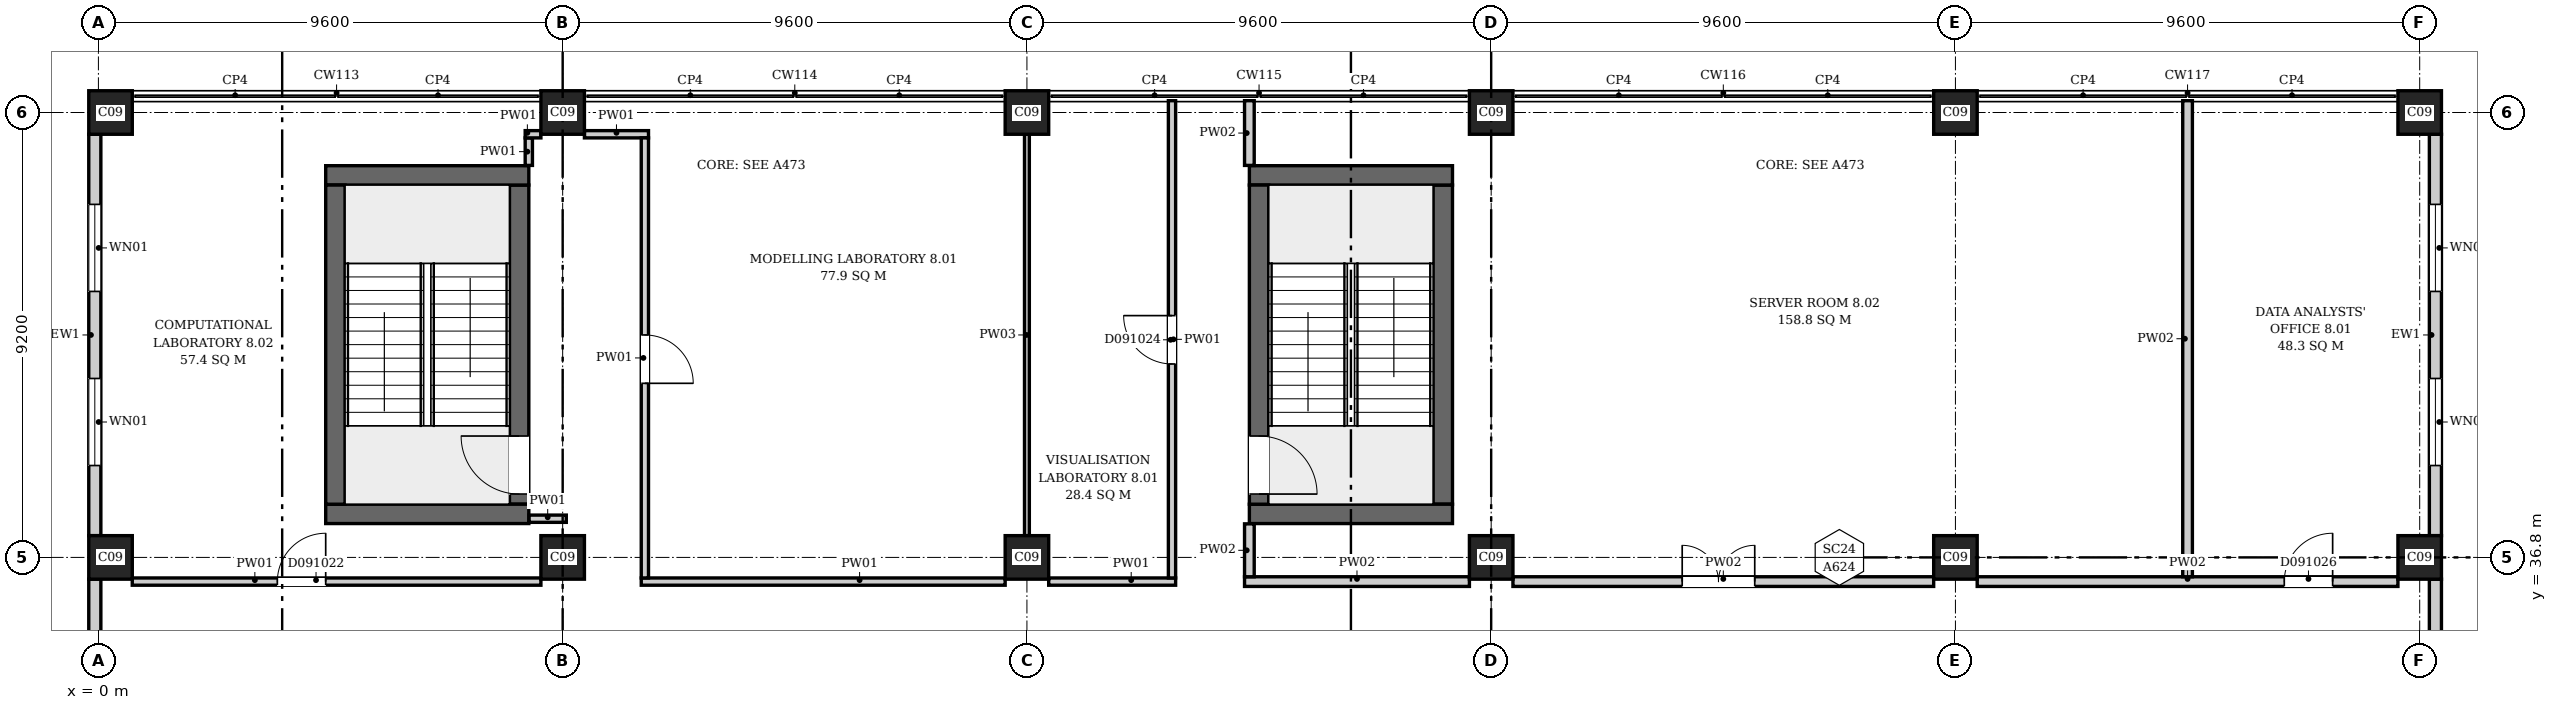
"""IFC4 building model, lengths in metres.
Left out: names, types, materials, properties, quantities, classifications, styles, units other than length and angle.
Written with IfcOpenShell. Run it as: python <this file> out.ifc"""

import sys

from ifc_helpers import new_model, si_unit, direction, frame, frame_2d, origin, origin_2d, place, context, subcontext, project, spatial, rectangle, extrude, element, fill, save


model = new_model("IFC4")
c1 = context("Model", 3, precision=1e-05, world=origin(), true_north=direction((0.0, 1.0)))
c2 = subcontext(c1, "Body", "Model", "MODEL_VIEW")
j1 = project(units=[si_unit("LENGTHUNIT", "METRE"), si_unit("PLANEANGLEUNIT", "RADIAN")], contexts=[c1])
p1 = place(None, origin())
s1 = spatial("IfcSite", under=j1, at=p1, CompositionType="ELEMENT")
p2 = place(p1, origin())
s2 = spatial("IfcBuilding", under=s1, at=p2, CompositionType="ELEMENT")
p3 = place(p2, frame((0.0, 0.0, 44.5)))
s3 = spatial("IfcBuildingStorey", under=s2, at=p3, CompositionType="ELEMENT", Elevation=44.5)
for number, where, z_axis, x_axis in (
    (1, (4.7, 37.7, 0.0), (0.0, 0.0, 1.0), (1.0, 0.0, 0.0)),
    (2, (4.7, 44.7, 0.0), (0.0, 0.0, 1.0), (1.0, 0.0, 0.0)),
):
    element("IfcWall", number, at=place(p3, frame(where, z_axis=z_axis, x_axis=x_axis)), inside=s3, PredefinedType="SHEAR", context=c2, shape_type="SweptSolid", body=[
        extrude(rectangle(XDim=4.2, YDim=0.4, at=frame_2d((2.1, 0.0))), origin(), (0.0, 0.0, 1.0), 4.2),
    ])
p4 = place(p3, frame((4.9, 37.9, 0.0), z_axis=(0.0, 0.0, 1.0), x_axis=(0.0, 1.0, 0.0)))
e3 = element("IfcWall", 3, at=p4, inside=s3, PredefinedType="SHEAR", context=c2, shape_type="SweptSolid", body=[
    extrude(rectangle(XDim=6.6, YDim=0.4, at=frame_2d((3.3, 0.0))), origin(), (0.0, 0.0, 1.0), 4.2),
])
p5 = place(p3, frame((8.7, 37.9, 0.0), z_axis=(0.0, 0.0, 1.0), x_axis=(0.0, 1.0, 0.0)))
e4 = element("IfcWall", 4, at=p5, inside=s3, PredefinedType="SHEAR", context=c2, shape_type="SweptSolid", body=[
    extrude(rectangle(XDim=6.6, YDim=0.4, at=frame_2d((3.3, 0.0))), origin(), (0.0, 0.0, 1.0), 4.2),
])
p6 = place(p5, frame((0.21, 0.0, 0.0)))
e5 = element("IfcOpeningElement", 5, at=p6, cuts=e4, PredefinedType="OPENING", context=c2, shape_type="SweptSolid", body=[
    extrude(rectangle(XDim=1.2, YDim=2.1, at=frame_2d((0.6, 1.05))), frame((0.0, 0.21, 0.0), z_axis=(0.0, -1.0, 0.0), x_axis=(1.0, 0.0, 0.0)), (0.0, 0.0, 1.0), 0.42),
])
for number, where, z_axis, x_axis in (
    (6, (23.8, 37.7, 0.0), (0.0, 0.0, 1.0), (1.0, 0.0, 0.0)),
    (7, (23.8, 44.7, 0.0), (0.0, 0.0, 1.0), (1.0, 0.0, 0.0)),
):
    element("IfcWall", number, at=place(p3, frame(where, z_axis=z_axis, x_axis=x_axis)), inside=s3, PredefinedType="SHEAR", context=c2, shape_type="SweptSolid", body=[
        extrude(rectangle(XDim=4.2, YDim=0.4, at=frame_2d((2.1, 0.0))), origin(), (0.0, 0.0, 1.0), 4.2),
    ])
p7 = place(p3, frame((24.0, 37.9, 0.0), z_axis=(0.0, 0.0, 1.0), x_axis=(0.0, 1.0, 0.0)))
e8 = element("IfcWall", 8, at=p7, inside=s3, PredefinedType="SHEAR", context=c2, shape_type="SweptSolid", body=[
    extrude(rectangle(XDim=6.6, YDim=0.4, at=frame_2d((3.3, 0.0))), origin(), (0.0, 0.0, 1.0), 4.2),
])
p8 = place(p7, frame((0.21, 0.0, 0.0)))
e9 = element("IfcOpeningElement", 9, at=p8, cuts=e8, PredefinedType="OPENING", context=c2, shape_type="SweptSolid", body=[
    extrude(rectangle(XDim=1.2, YDim=2.1, at=frame_2d((0.6, 1.05))), frame((0.0, 0.21, 0.0), z_axis=(0.0, -1.0, 0.0), x_axis=(1.0, 0.0, 0.0)), (0.0, 0.0, 1.0), 0.42),
])
p9 = place(p3, frame((27.8, 37.9, 0.0), z_axis=(0.0, 0.0, 1.0), x_axis=(0.0, 1.0, 0.0)))
e10 = element("IfcWall", 10, at=p9, inside=s3, PredefinedType="SHEAR", context=c2, shape_type="SweptSolid", body=[
    extrude(rectangle(XDim=6.6, YDim=0.4, at=frame_2d((3.3, 0.0))), origin(), (0.0, 0.0, 1.0), 4.2),
])
for number, where, z_axis, x_axis in (
    (11, (0.25, 36.8, 0.0), (0.0, 0.0, 1.0), (1.0, 0.0, 0.0)),
    (12, (9.6, 36.8, 0.0), (0.0, 0.0, 1.0), (1.0, 0.0, 0.0)),
    (13, (19.2, 36.8, 0.0), (0.0, 0.0, 1.0), (1.0, 0.0, 0.0)),
    (14, (28.8, 36.8, 0.0), (0.0, 0.0, 1.0), (1.0, 0.0, 0.0)),
    (15, (38.4, 36.8, 0.0), (0.0, 0.0, 1.0), (1.0, 0.0, 0.0)),
    (16, (48.0, 36.8, 0.0), (0.0, 0.0, 1.0), (1.0, 0.0, 0.0)),
    (17, (0.25, 46.0, 0.0), (0.0, 0.0, 1.0), (1.0, 0.0, 0.0)),
    (18, (9.6, 46.0, 0.0), (0.0, 0.0, 1.0), (1.0, 0.0, 0.0)),
    (19, (19.2, 46.0, 0.0), (0.0, 0.0, 1.0), (1.0, 0.0, 0.0)),
    (20, (28.8, 46.0, 0.0), (0.0, 0.0, 1.0), (1.0, 0.0, 0.0)),
    (21, (38.4, 46.0, 0.0), (0.0, 0.0, 1.0), (1.0, 0.0, 0.0)),
    (22, (48.0, 46.0, 0.0), (0.0, 0.0, 1.0), (1.0, 0.0, 0.0)),
):
    element("IfcColumn", number, at=place(p3, frame(where, z_axis=z_axis, x_axis=x_axis)), inside=s3, PredefinedType="COLUMN", context=c2, shape_type="SweptSolid", body=[
        extrude(rectangle(XDim=0.9, YDim=0.9, at=origin_2d()), origin(), (0.0, 0.0, 1.0), 4.2),
    ])
p10 = place(p3, frame((-0.074, 36.35, 0.0), z_axis=(0.0, 0.0, 1.0), x_axis=(0.0, -1.0, 0.0)))
e23 = element("IfcWall", 23, at=p10, inside=s3, PredefinedType="ELEMENTEDWALL", context=c2, shape_type="SweptSolid", body=[
    extrude(rectangle(XDim=8.3, YDim=0.25, at=frame_2d((4.15, 0.0))), origin(), (0.0, 0.0, 1.0), 3.9),
])
p11 = place(p10, frame((5.05, 0.0, 0.9)))
e24 = element("IfcOpeningElement", 24, at=p11, cuts=e23, PredefinedType="OPENING", context=c2, shape_type="SweptSolid", body=[
    extrude(rectangle(XDim=1.8, YDim=2.6, at=frame_2d((0.9, 1.3))), frame((0.0, 0.135, 0.0), z_axis=(0.0, -1.0, 0.0), x_axis=(1.0, 0.0, 0.0)), (0.0, 0.0, 1.0), 0.27),
])
p12 = place(p10, frame((1.7, 0.0, 0.9)))
e25 = element("IfcOpeningElement", 25, at=p12, cuts=e23, PredefinedType="OPENING", context=c2, shape_type="SweptSolid", body=[
    extrude(rectangle(XDim=1.8, YDim=2.6, at=frame_2d((0.9, 1.3))), frame((0.0, 0.135, 0.0), z_axis=(0.0, -1.0, 0.0), x_axis=(1.0, 0.0, 0.0)), (0.0, 0.0, 1.0), 0.27),
])
p13 = place(p3, frame((-0.074, 45.55, 0.0), z_axis=(0.0, 0.0, 1.0), x_axis=(0.0, -1.0, 0.0)))
e26 = element("IfcWall", 26, at=p13, inside=s3, PredefinedType="ELEMENTEDWALL", context=c2, shape_type="SweptSolid", body=[
    extrude(rectangle(XDim=8.3, YDim=0.25, at=frame_2d((4.15, 0.0))), origin(), (0.0, 0.0, 1.0), 3.9),
])
p14 = place(p13, frame((5.05, 0.0, 0.9)))
e27 = element("IfcOpeningElement", 27, at=p14, cuts=e26, PredefinedType="OPENING", context=c2, shape_type="SweptSolid", body=[
    extrude(rectangle(XDim=1.8, YDim=2.6, at=frame_2d((0.9, 1.3))), frame((0.0, 0.135, 0.0), z_axis=(0.0, -1.0, 0.0), x_axis=(1.0, 0.0, 0.0)), (0.0, 0.0, 1.0), 0.27),
])
p15 = place(p13, frame((1.45, 0.0, 0.9)))
e28 = element("IfcOpeningElement", 28, at=p15, cuts=e26, PredefinedType="OPENING", context=c2, shape_type="SweptSolid", body=[
    extrude(rectangle(XDim=1.8, YDim=2.6, at=frame_2d((0.9, 1.3))), frame((0.0, 0.135, 0.0), z_axis=(0.0, -1.0, 0.0), x_axis=(1.0, 0.0, 0.0)), (0.0, 0.0, 1.0), 0.27),
])
p16 = place(p3, frame((48.325, 28.05, 0.0), z_axis=(0.0, 0.0, 1.0), x_axis=(0.0, 1.0, 0.0)))
e29 = element("IfcWall", 29, at=p16, inside=s3, PredefinedType="ELEMENTEDWALL", context=c2, shape_type="SweptSolid", body=[
    extrude(rectangle(XDim=8.3, YDim=0.25, at=frame_2d((4.15, 0.0))), origin(), (0.0, 0.0, 1.0), 3.9),
])
p17 = place(p16, frame((1.45, 0.0, 0.9)))
e30 = element("IfcOpeningElement", 30, at=p17, cuts=e29, PredefinedType="OPENING", context=c2, shape_type="SweptSolid", body=[
    extrude(rectangle(XDim=1.8, YDim=2.6, at=frame_2d((0.9, 1.3))), frame((0.0, 0.135, 0.0), z_axis=(0.0, -1.0, 0.0), x_axis=(1.0, 0.0, 0.0)), (0.0, 0.0, 1.0), 0.27),
])
p18 = place(p16, frame((4.8, 0.0, 0.9)))
e31 = element("IfcOpeningElement", 31, at=p18, cuts=e29, PredefinedType="OPENING", context=c2, shape_type="SweptSolid", body=[
    extrude(rectangle(XDim=1.8, YDim=2.6, at=frame_2d((0.9, 1.3))), frame((0.0, 0.135, 0.0), z_axis=(0.0, -1.0, 0.0), x_axis=(1.0, 0.0, 0.0)), (0.0, 0.0, 1.0), 0.27),
])
p19 = place(p3, frame((48.325, 37.25, 0.0), z_axis=(0.0, 0.0, 1.0), x_axis=(0.0, 1.0, 0.0)))
e32 = element("IfcWall", 32, at=p19, inside=s3, PredefinedType="ELEMENTEDWALL", context=c2, shape_type="SweptSolid", body=[
    extrude(rectangle(XDim=8.3, YDim=0.25, at=frame_2d((4.15, 0.0))), origin(), (0.0, 0.0, 1.0), 3.9),
])
p20 = place(p19, frame((1.45, 0.0, 0.9)))
e33 = element("IfcOpeningElement", 33, at=p20, cuts=e32, PredefinedType="OPENING", context=c2, shape_type="SweptSolid", body=[
    extrude(rectangle(XDim=1.8, YDim=2.6, at=frame_2d((0.9, 1.3))), frame((0.0, 0.135, 0.0), z_axis=(0.0, -1.0, 0.0), x_axis=(1.0, 0.0, 0.0)), (0.0, 0.0, 1.0), 0.27),
])
p21 = place(p19, frame((5.05, 0.0, 0.9)))
e34 = element("IfcOpeningElement", 34, at=p21, cuts=e32, PredefinedType="OPENING", context=c2, shape_type="SweptSolid", body=[
    extrude(rectangle(XDim=1.8, YDim=2.6, at=frame_2d((0.9, 1.3))), frame((0.0, 0.135, 0.0), z_axis=(0.0, -1.0, 0.0), x_axis=(1.0, 0.0, 0.0)), (0.0, 0.0, 1.0), 0.27),
])
p22 = place(p3, frame((0.7, 36.3, 0.0), z_axis=(0.0, 0.0, 1.0), x_axis=(1.0, 0.0, 0.0)))
e35 = element("IfcWall", 35, at=p22, inside=s3, PredefinedType="PARTITIONING", context=c2, shape_type="SweptSolid", body=[
    extrude(rectangle(XDim=8.45, YDim=0.15, at=frame_2d((4.225, 0.0))), origin(), (0.0, 0.0, 1.0), 3.9),
])
p23 = place(p22, frame((3.0, 0.0, 0.0)))
e36 = element("IfcOpeningElement", 36, at=p23, cuts=e35, PredefinedType="OPENING", context=c2, shape_type="SweptSolid", body=[
    extrude(rectangle(XDim=1.0, YDim=2.1, at=frame_2d((0.5, 1.05))), frame((0.0, 0.085, 0.0), z_axis=(0.0, -1.0, 0.0), x_axis=(1.0, 0.0, 0.0)), (0.0, 0.0, 1.0), 0.17),
])
p24 = place(p3, frame((8.9, 44.906, 0.0), z_axis=(0.0, 0.0, 1.0), x_axis=(0.0, 1.0, 0.0)))
e37 = element("IfcWall", 37, at=p24, inside=s3, PredefinedType="PARTITIONING", context=c2, shape_type="SweptSolid", body=[
    extrude(rectangle(XDim=0.569, YDim=0.15, at=frame_2d((0.285, 0.0))), origin(), (0.0, 0.0, 1.0), 3.9),
])
p25 = place(p3, frame((8.825, 45.55, 0.0), z_axis=(0.0, 0.0, 1.0), x_axis=(1.0, 0.0, 0.0)))
e38 = element("IfcWall", 38, at=p25, inside=s3, PredefinedType="PARTITIONING", context=c2, shape_type="SweptSolid", body=[
    extrude(rectangle(XDim=0.325, YDim=0.15, at=frame_2d((0.163, 0.0))), origin(), (0.0, 0.0, 1.0), 3.9),
])
p26 = place(p3, frame((8.906, 37.6, 0.0), z_axis=(0.0, 0.0, 1.0), x_axis=(1.0, 0.0, 0.0)))
e39 = element("IfcWall", 39, at=p26, inside=s3, PredefinedType="PARTITIONING", context=c2, shape_type="SweptSolid", body=[
    extrude(rectangle(XDim=0.769, YDim=0.15, at=frame_2d((0.385, 0.0))), origin(), (0.0, 0.0, 1.0), 3.9),
])
p27 = place(p3, frame((10.05, 45.55, 0.0), z_axis=(0.0, 0.0, 1.0), x_axis=(1.0, 0.0, 0.0)))
e40 = element("IfcWall", 40, at=p27, inside=s3, PredefinedType="PARTITIONING", context=c2, shape_type="SweptSolid", body=[
    extrude(rectangle(XDim=1.325, YDim=0.15, at=frame_2d((0.663, 0.0))), origin(), (0.0, 0.0, 1.0), 3.9),
])
p28 = place(p3, frame((11.225, 36.3, 0.0), z_axis=(0.0, 0.0, 1.0), x_axis=(1.0, 0.0, 0.0)))
e41 = element("IfcWall", 41, at=p28, inside=s3, PredefinedType="PARTITIONING", context=c2, shape_type="SweptSolid", body=[
    extrude(rectangle(XDim=7.525, YDim=0.15, at=frame_2d((3.762, 0.0))), origin(), (0.0, 0.0, 1.0), 3.9),
])
p29 = place(p3, frame((11.3, 36.375, 0.0), z_axis=(0.0, 0.0, 1.0), x_axis=(0.0, 1.0, 0.0)))
e42 = element("IfcWall", 42, at=p29, inside=s3, PredefinedType="PARTITIONING", context=c2, shape_type="SweptSolid", body=[
    extrude(rectangle(XDim=9.1, YDim=0.15, at=frame_2d((4.55, 0.0))), origin(), (0.0, 0.0, 1.0), 3.9),
])
p30 = place(p29, frame((4.025, 0.0, 0.0)))
e43 = element("IfcOpeningElement", 43, at=p30, cuts=e42, PredefinedType="OPENING", context=c2, shape_type="SweptSolid", body=[
    extrude(rectangle(XDim=1.0, YDim=2.1, at=frame_2d((0.5, 1.05))), frame((0.0, 0.085, 0.0), z_axis=(0.0, -1.0, 0.0), x_axis=(1.0, 0.0, 0.0)), (0.0, 0.0, 1.0), 0.17),
])
p31 = place(p3, frame((19.2, 37.25, 0.0), z_axis=(0.0, 0.0, 1.0), x_axis=(0.0, 1.0, 0.0)))
e44 = element("IfcWall", 44, at=p31, inside=s3, PredefinedType="PARTITIONING", context=c2, shape_type="SweptSolid", body=[
    extrude(rectangle(XDim=8.3, YDim=0.1, at=frame_2d((4.15, 0.0))), origin(), (0.0, 0.0, 1.0), 3.9),
])
p32 = place(p3, frame((19.65, 36.3, 0.0), z_axis=(0.0, 0.0, 1.0), x_axis=(1.0, 0.0, 0.0)))
e45 = element("IfcWall", 45, at=p32, inside=s3, PredefinedType="PARTITIONING", context=c2, shape_type="SweptSolid", body=[
    extrude(rectangle(XDim=2.625, YDim=0.15, at=frame_2d((1.312, 0.0))), origin(), (0.0, 0.0, 1.0), 3.9),
])
p33 = place(p3, frame((22.2, 36.375, 0.0), z_axis=(0.0, 0.0, 1.0), x_axis=(0.0, 1.0, 0.0)))
e46 = element("IfcWall", 46, at=p33, inside=s3, PredefinedType="PARTITIONING", context=c2, shape_type="SweptSolid", body=[
    extrude(rectangle(XDim=9.869, YDim=0.15, at=frame_2d((4.935, 0.0))), origin(), (0.0, 0.0, 1.0), 3.9),
])
p34 = place(p33, frame((4.425, 0.0, 0.0)))
e47 = element("IfcOpeningElement", 47, at=p34, cuts=e46, PredefinedType="OPENING", context=c2, shape_type="SweptSolid", body=[
    extrude(rectangle(XDim=1.0, YDim=2.1, at=frame_2d((0.5, 1.05))), frame((0.0, 0.085, 0.0), z_axis=(0.0, -1.0, 0.0), x_axis=(1.0, 0.0, 0.0)), (0.0, 0.0, 1.0), 0.17),
])
p35 = place(p3, frame((23.7, 36.3, 0.0), z_axis=(0.0, 0.0, 1.0), x_axis=(1.0, 0.0, 0.0)))
e48 = element("IfcWall", 48, at=p35, inside=s3, PredefinedType="PARTITIONING", context=c2, shape_type="SweptSolid", body=[
    extrude(rectangle(XDim=4.65, YDim=0.2, at=frame_2d((2.325, 0.0))), origin(), (0.0, 0.0, 1.0), 3.9),
])
p36 = place(p3, frame((23.8, 36.4, 0.0), z_axis=(0.0, 0.0, 1.0), x_axis=(0.0, 1.0, 0.0)))
e49 = element("IfcWall", 49, at=p36, inside=s3, PredefinedType="PARTITIONING", context=c2, shape_type="SweptSolid", body=[
    extrude(rectangle(XDim=1.094, YDim=0.2, at=frame_2d((0.547, 0.0))), origin(), (0.0, 0.0, 1.0), 3.9),
])
p37 = place(p3, frame((23.8, 44.906, 0.0), z_axis=(0.0, 0.0, 1.0), x_axis=(0.0, 1.0, 0.0)))
e50 = element("IfcWall", 50, at=p37, inside=s3, PredefinedType="PARTITIONING", context=c2, shape_type="SweptSolid", body=[
    extrude(rectangle(XDim=1.338, YDim=0.2, at=frame_2d((0.669, 0.0))), origin(), (0.0, 0.0, 1.0), 3.9),
])
p38 = place(p3, frame((29.25, 36.3, 0.0), z_axis=(0.0, 0.0, 1.0), x_axis=(1.0, 0.0, 0.0)))
e51 = element("IfcWall", 51, at=p38, inside=s3, PredefinedType="PARTITIONING", context=c2, shape_type="SweptSolid", body=[
    extrude(rectangle(XDim=8.7, YDim=0.2, at=frame_2d((4.35, 0.0))), origin(), (0.0, 0.0, 1.0), 3.9),
])
p39 = place(p38, frame((3.5, 0.0, 0.0)))
e52 = element("IfcOpeningElement", 52, at=p39, cuts=e51, PredefinedType="OPENING", context=c2, shape_type="SweptSolid", body=[
    extrude(rectangle(XDim=1.5, YDim=2.1, at=frame_2d((0.75, 1.05))), frame((0.0, 0.11, 0.0), z_axis=(0.0, -1.0, 0.0), x_axis=(1.0, 0.0, 0.0)), (0.0, 0.0, 1.0), 0.22),
])
p40 = place(p3, frame((38.85, 36.3, 0.0), z_axis=(0.0, 0.0, 1.0), x_axis=(1.0, 0.0, 0.0)))
e53 = element("IfcWall", 53, at=p40, inside=s3, PredefinedType="PARTITIONING", context=c2, shape_type="SweptSolid", body=[
    extrude(rectangle(XDim=8.7, YDim=0.2, at=frame_2d((4.35, 0.0))), origin(), (0.0, 0.0, 1.0), 3.9),
])
p41 = place(p40, frame((6.35, 0.0, 0.0)))
e54 = element("IfcOpeningElement", 54, at=p41, cuts=e53, PredefinedType="OPENING", context=c2, shape_type="SweptSolid", body=[
    extrude(rectangle(XDim=1.0, YDim=2.1, at=frame_2d((0.5, 1.05))), frame((0.0, 0.11, 0.0), z_axis=(0.0, -1.0, 0.0), x_axis=(1.0, 0.0, 0.0)), (0.0, 0.0, 1.0), 0.22),
])
p42 = place(p3, frame((43.2, 36.4, 0.0), z_axis=(0.0, 0.0, 1.0), x_axis=(0.0, 1.0, 0.0)))
e55 = element("IfcWall", 55, at=p42, inside=s3, PredefinedType="PARTITIONING", context=c2, shape_type="SweptSolid", body=[
    extrude(rectangle(XDim=9.844, YDim=0.2, at=frame_2d((4.922, 0.0))), origin(), (0.0, 0.0, 1.0), 3.9),
])
p43 = place(p14, origin())
e56 = element("IfcWindow", 56, at=p43, inside=s3, PartitioningType="SINGLE_PANEL", PredefinedType="WINDOW", context=c2, shape_type="SweptSolid", body=[
    extrude(rectangle(XDim=1.8, YDim=2.6, at=frame_2d((0.9, 1.3))), frame((0.0, 0.03, 0.0), z_axis=(0.0, -1.0, 0.0), x_axis=(1.0, 0.0, 0.0)), (0.0, 0.0, 1.0), 0.06),
])
fill(e27, e56)
p44 = place(p15, origin())
e57 = element("IfcWindow", 57, at=p44, inside=s3, PartitioningType="SINGLE_PANEL", PredefinedType="WINDOW", context=c2, shape_type="SweptSolid", body=[
    extrude(rectangle(XDim=1.8, YDim=2.6, at=frame_2d((0.9, 1.3))), frame((0.0, 0.03, 0.0), z_axis=(0.0, -1.0, 0.0), x_axis=(1.0, 0.0, 0.0)), (0.0, 0.0, 1.0), 0.06),
])
fill(e28, e57)
p45 = place(p20, origin())
e58 = element("IfcWindow", 58, at=p45, inside=s3, PartitioningType="SINGLE_PANEL", PredefinedType="WINDOW", context=c2, shape_type="SweptSolid", body=[
    extrude(rectangle(XDim=1.8, YDim=2.6, at=frame_2d((0.9, 1.3))), frame((0.0, 0.03, 0.0), z_axis=(0.0, -1.0, 0.0), x_axis=(1.0, 0.0, 0.0)), (0.0, 0.0, 1.0), 0.06),
])
fill(e33, e58)
p46 = place(p21, origin())
e59 = element("IfcWindow", 59, at=p46, inside=s3, PartitioningType="SINGLE_PANEL", PredefinedType="WINDOW", context=c2, shape_type="SweptSolid", body=[
    extrude(rectangle(XDim=1.8, YDim=2.6, at=frame_2d((0.9, 1.3))), frame((0.0, 0.03, 0.0), z_axis=(0.0, -1.0, 0.0), x_axis=(1.0, 0.0, 0.0)), (0.0, 0.0, 1.0), 0.06),
])
fill(e34, e59)
p47 = place(p6, origin())
e60 = element("IfcDoor", 60, at=p47, inside=s3, OperationType="SINGLE_SWING_RIGHT", PredefinedType="DOOR", context=c2, shape_type="SweptSolid", body=[
    extrude(rectangle(XDim=1.2, YDim=2.1, at=frame_2d((0.6, 1.05))), frame((0.0, 0.025, 0.0), z_axis=(0.0, -1.0, 0.0), x_axis=(1.0, 0.0, 0.0)), (0.0, 0.0, 1.0), 0.05),
])
fill(e5, e60)
p48 = place(p8, origin())
e61 = element("IfcDoor", 61, at=p48, inside=s3, OperationType="SINGLE_SWING_LEFT", PredefinedType="DOOR", context=c2, shape_type="SweptSolid", body=[
    extrude(rectangle(XDim=1.2, YDim=2.1, at=frame_2d((0.6, 1.05))), frame((0.0, 0.025, 0.0), z_axis=(0.0, -1.0, 0.0), x_axis=(1.0, 0.0, 0.0)), (0.0, 0.0, 1.0), 0.05),
])
fill(e9, e61)
p49 = place(p23, origin())
e62 = element("IfcDoor", 62, at=p49, inside=s3, OperationType="SINGLE_SWING_RIGHT", PredefinedType="DOOR", context=c2, shape_type="SweptSolid", body=[
    extrude(rectangle(XDim=1.0, YDim=2.1, at=frame_2d((0.5, 1.05))), frame((0.0, 0.025, 0.0), z_axis=(0.0, -1.0, 0.0), x_axis=(1.0, 0.0, 0.0)), (0.0, 0.0, 1.0), 0.05),
])
fill(e36, e62)
p50 = place(p30, origin())
e63 = element("IfcDoor", 63, at=p50, inside=s3, OperationType="SINGLE_SWING_LEFT", PredefinedType="DOOR", context=c2, shape_type="SweptSolid", body=[
    extrude(rectangle(XDim=1.0, YDim=2.1, at=frame_2d((0.5, 1.05))), frame((0.0, 0.025, 0.0), z_axis=(0.0, -1.0, 0.0), x_axis=(1.0, 0.0, 0.0)), (0.0, 0.0, 1.0), 0.05),
])
fill(e43, e63)
p51 = place(p34, origin())
e64 = element("IfcDoor", 64, at=p51, inside=s3, OperationType="SINGLE_SWING_RIGHT", PredefinedType="DOOR", context=c2, shape_type="SweptSolid", body=[
    extrude(rectangle(XDim=1.0, YDim=2.1, at=frame_2d((0.5, 1.05))), frame((0.0, 0.025, 0.0), z_axis=(0.0, -1.0, 0.0), x_axis=(1.0, 0.0, 0.0)), (0.0, 0.0, 1.0), 0.05),
])
fill(e47, e64)
p52 = place(p39, origin())
e65 = element("IfcDoor", 65, at=p52, inside=s3, OperationType="DOUBLE_DOOR_SINGLE_SWING", PredefinedType="DOOR", context=c2, shape_type="SweptSolid", body=[
    extrude(rectangle(XDim=1.5, YDim=2.1, at=frame_2d((0.75, 1.05))), frame((0.0, 0.025, 0.0), z_axis=(0.0, -1.0, 0.0), x_axis=(1.0, 0.0, 0.0)), (0.0, 0.0, 1.0), 0.05),
])
fill(e52, e65)
p53 = place(p41, origin())
e66 = element("IfcDoor", 66, at=p53, inside=s3, OperationType="SINGLE_SWING_RIGHT", PredefinedType="DOOR", context=c2, shape_type="SweptSolid", body=[
    extrude(rectangle(XDim=1.0, YDim=2.1, at=frame_2d((0.5, 1.05))), frame((0.0, 0.025, 0.0), z_axis=(0.0, -1.0, 0.0), x_axis=(1.0, 0.0, 0.0)), (0.0, 0.0, 1.0), 0.05),
])
fill(e54, e66)
save(model, sys.argv[1])
